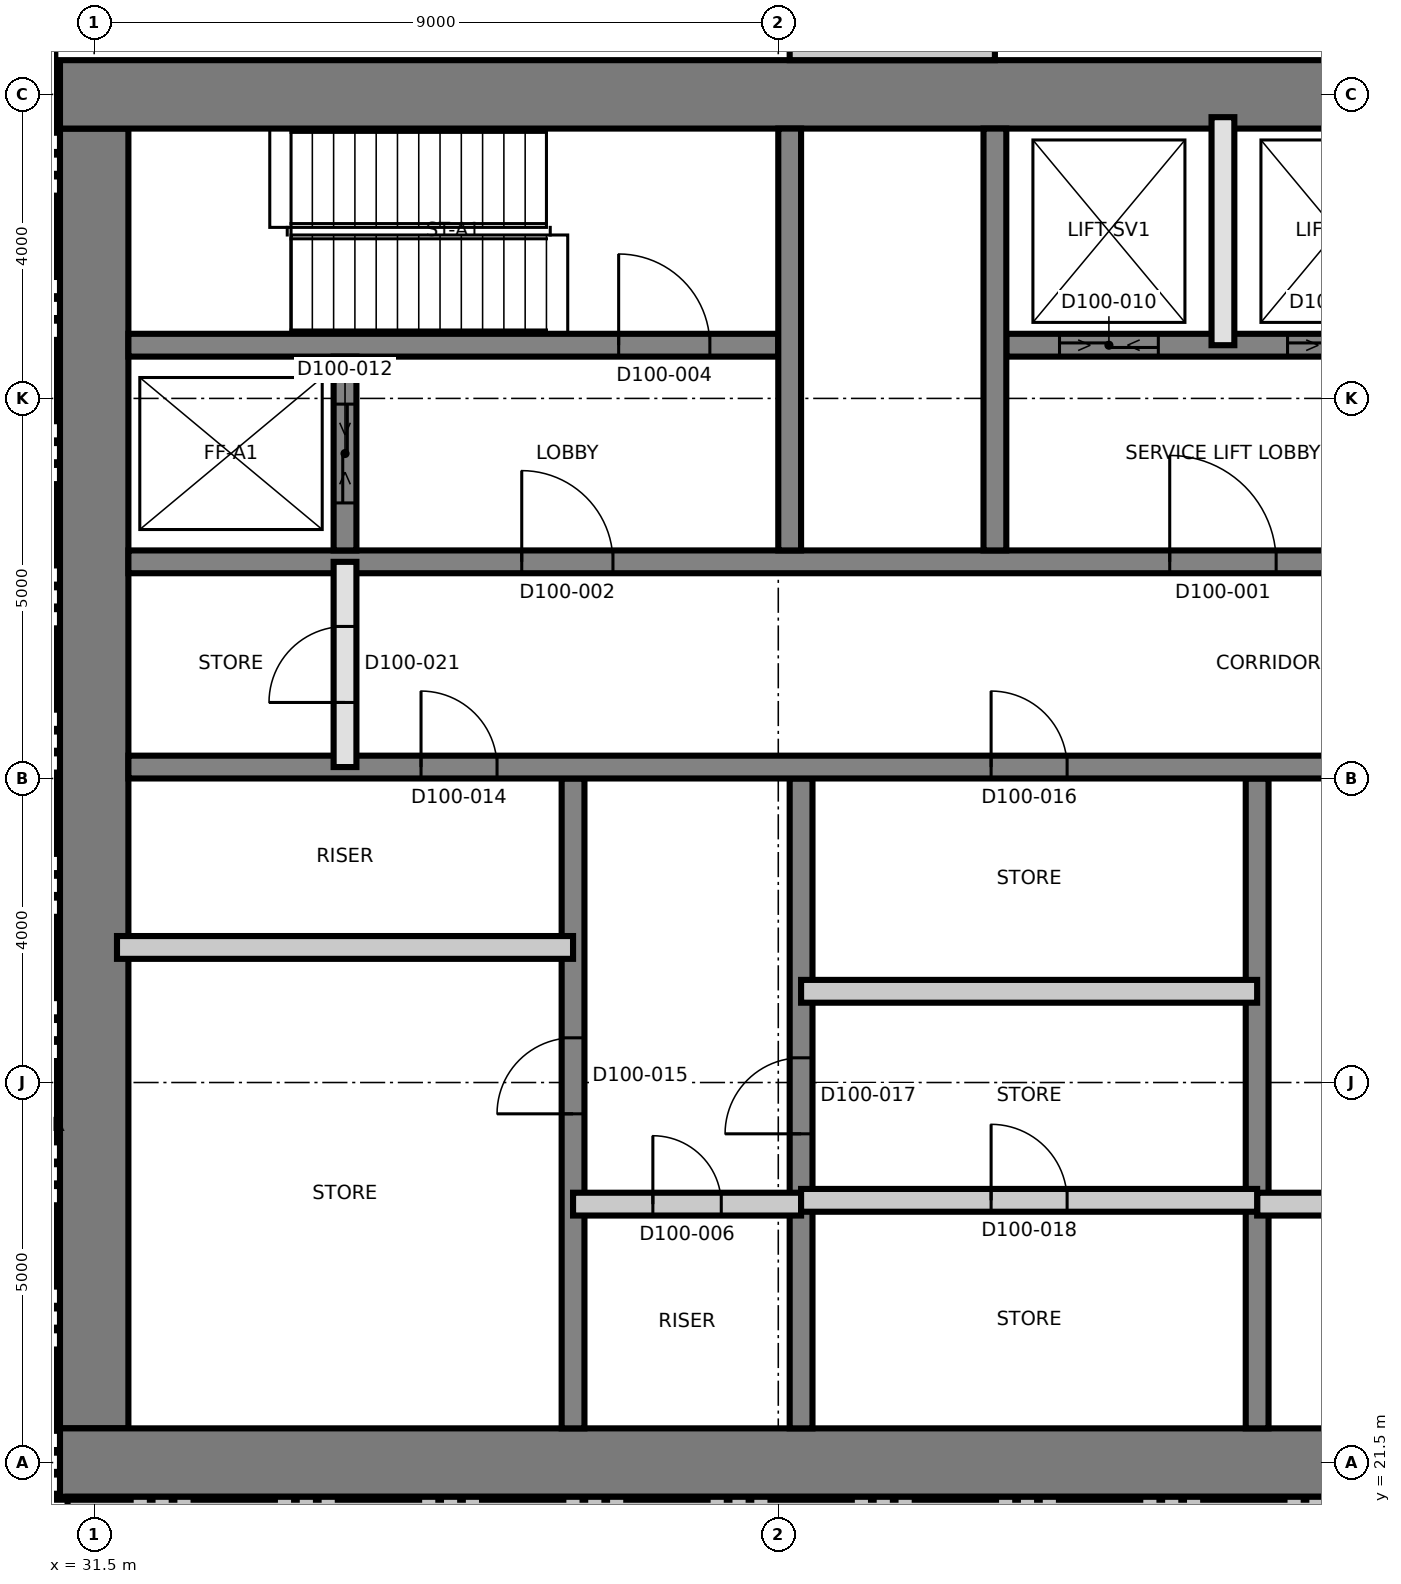
"""IFC4 building model, lengths in metres.
Left out: names, types, materials, properties, quantities, classifications, styles, units other than length and angle.
Written with IfcOpenShell. Run it as: python <this file> out.ifc"""

import sys

from ifc_helpers import new_model, si_unit, direction, frame, frame_2d, origin, place, context, subcontext, project, spatial, rectangle, extrude, element, fill, save


model = new_model("IFC4")
c1 = context("Model", 3, precision=1e-05, world=origin(), true_north=direction((0.0, 1.0)))
c2 = subcontext(c1, "Body", "Model", "MODEL_VIEW")
j1 = project(units=[si_unit("LENGTHUNIT", "METRE"), si_unit("PLANEANGLEUNIT", "RADIAN")], contexts=[c1])
p1 = place(None, origin())
s1 = spatial("IfcSite", under=j1, at=p1, CompositionType="ELEMENT")
p2 = place(p1, origin())
s2 = spatial("IfcBuilding", under=s1, at=p2, CompositionType="ELEMENT")
p3 = place(p2, frame((0.0, 0.0, -9.0)))
s3 = spatial("IfcBuildingStorey", under=s2, at=p3, CompositionType="ELEMENT", Elevation=-9.0)
p4 = place(p3, frame((31.5, 21.95, 0.0), z_axis=(0.0, 0.0, 1.0), x_axis=(0.0, 1.0, 0.0)))
e1 = element("IfcWall", 1, at=p4, inside=s3, PredefinedType="SHEAR", context=c2, shape_type="SweptSolid", body=[
    extrude(rectangle(XDim=17.1, YDim=0.9, at=frame_2d((8.55, 0.0))), origin(), (0.0, 0.0, 1.0), 4.5),
])
for number, where, z_axis, x_axis in (
    (2, (31.05, 21.5, 0.0), (0.0, 0.0, 1.0), (1.0, 0.0, 0.0)),
    (3, (31.05, 39.5, 0.0), (0.0, 0.0, 1.0), (1.0, 0.0, 0.0)),
):
    element("IfcWall", number, at=place(p3, frame(where, z_axis=z_axis, x_axis=x_axis)), inside=s3, PredefinedType="SHEAR", context=c2, shape_type="SweptSolid", body=[
        extrude(rectangle(XDim=27.0, YDim=0.9, at=frame_2d((13.5, 0.0))), origin(), (0.0, 0.0, 1.0), 4.5),
    ])
p5 = place(p3, frame((37.8, 21.95, 0.0), z_axis=(0.0, 0.0, 1.0), x_axis=(0.0, 1.0, 0.0)))
e4 = element("IfcWall", 4, at=p5, inside=s3, PredefinedType="SHEAR", context=c2, shape_type="SweptSolid", body=[
    extrude(rectangle(XDim=8.55, YDim=0.3, at=frame_2d((4.275, 0.0))), origin(), (0.0, 0.0, 1.0), 4.5),
])
p6 = place(p5, frame((4.138, 0.0, 0.0)))
e5 = element("IfcOpeningElement", 5, at=p6, cuts=e4, PredefinedType="OPENING", context=c2, shape_type="SweptSolid", body=[
    extrude(rectangle(XDim=1.0, YDim=2.1, at=frame_2d((0.5, 1.05))), frame((0.0, 0.16, 0.0), z_axis=(0.0, -1.0, 0.0), x_axis=(1.0, 0.0, 0.0)), (0.0, 0.0, 1.0), 0.32),
])
p7 = place(p3, frame((40.8, 21.95, 0.0), z_axis=(0.0, 0.0, 1.0), x_axis=(0.0, 1.0, 0.0)))
e6 = element("IfcWall", 6, at=p7, inside=s3, PredefinedType="SHEAR", context=c2, shape_type="SweptSolid", body=[
    extrude(rectangle(XDim=8.55, YDim=0.3, at=frame_2d((4.275, 0.0))), origin(), (0.0, 0.0, 1.0), 4.5),
])
p8 = place(p7, frame((3.875, 0.0, 0.0)))
e7 = element("IfcOpeningElement", 7, at=p8, cuts=e6, PredefinedType="OPENING", context=c2, shape_type="SweptSolid", body=[
    extrude(rectangle(XDim=1.0, YDim=2.1, at=frame_2d((0.5, 1.05))), frame((0.0, 0.16, 0.0), z_axis=(0.0, -1.0, 0.0), x_axis=(1.0, 0.0, 0.0)), (0.0, 0.0, 1.0), 0.32),
])
p9 = place(p3, frame((46.8, 21.95, 0.0), z_axis=(0.0, 0.0, 1.0), x_axis=(0.0, 1.0, 0.0)))
e8 = element("IfcWall", 8, at=p9, inside=s3, PredefinedType="SHEAR", context=c2, shape_type="SweptSolid", body=[
    extrude(rectangle(XDim=8.55, YDim=0.3, at=frame_2d((4.275, 0.0))), origin(), (0.0, 0.0, 1.0), 4.5),
])
p10 = place(p3, frame((31.95, 30.65, 0.0), z_axis=(0.0, 0.0, 1.0), x_axis=(1.0, 0.0, 0.0)))
e9 = element("IfcWall", 9, at=p10, inside=s3, PredefinedType="SHEAR", context=c2, shape_type="SweptSolid", body=[
    extrude(rectangle(XDim=26.1, YDim=0.3, at=frame_2d((13.05, 0.0))), origin(), (0.0, 0.0, 1.0), 4.5),
])
p11 = place(p10, frame((24.55, 0.0, 0.0)))
e10 = element("IfcOpeningElement", 10, at=p11, cuts=e9, PredefinedType="OPENING", context=c2, shape_type="SweptSolid", body=[
    extrude(rectangle(XDim=1.0, YDim=2.1, at=frame_2d((0.5, 1.05))), frame((0.0, 0.16, 0.0), z_axis=(0.0, -1.0, 0.0), x_axis=(1.0, 0.0, 0.0)), (0.0, 0.0, 1.0), 0.32),
])
p12 = place(p10, frame((3.85, 0.0, 0.0)))
e11 = element("IfcOpeningElement", 11, at=p12, cuts=e9, PredefinedType="OPENING", context=c2, shape_type="SweptSolid", body=[
    extrude(rectangle(XDim=1.0, YDim=2.1, at=frame_2d((0.5, 1.05))), frame((0.0, 0.16, 0.0), z_axis=(0.0, -1.0, 0.0), x_axis=(1.0, 0.0, 0.0)), (0.0, 0.0, 1.0), 0.32),
])
p13 = place(p10, frame((11.35, 0.0, 0.0)))
e12 = element("IfcOpeningElement", 12, at=p13, cuts=e9, PredefinedType="OPENING", context=c2, shape_type="SweptSolid", body=[
    extrude(rectangle(XDim=1.0, YDim=2.1, at=frame_2d((0.5, 1.05))), frame((0.0, 0.16, 0.0), z_axis=(0.0, -1.0, 0.0), x_axis=(1.0, 0.0, 0.0)), (0.0, 0.0, 1.0), 0.32),
])
p14 = place(p3, frame((31.95, 33.35, 0.0), z_axis=(0.0, 0.0, 1.0), x_axis=(1.0, 0.0, 0.0)))
e13 = element("IfcWall", 13, at=p14, inside=s3, PredefinedType="SHEAR", context=c2, shape_type="SweptSolid", body=[
    extrude(rectangle(XDim=26.1, YDim=0.3, at=frame_2d((13.05, 0.0))), origin(), (0.0, 0.0, 1.0), 4.5),
])
p15 = place(p14, frame((13.7, 0.0, 0.0)))
e14 = element("IfcOpeningElement", 14, at=p15, cuts=e13, PredefinedType="OPENING", context=c2, shape_type="SweptSolid", body=[
    extrude(rectangle(XDim=1.4, YDim=2.1, at=frame_2d((0.7, 1.05))), frame((0.0, 0.16, 0.0), z_axis=(0.0, -1.0, 0.0), x_axis=(1.0, 0.0, 0.0)), (0.0, 0.0, 1.0), 0.32),
])
p16 = place(p14, frame((5.175, 0.0, 0.0)))
e15 = element("IfcOpeningElement", 15, at=p16, cuts=e13, PredefinedType="OPENING", context=c2, shape_type="SweptSolid", body=[
    extrude(rectangle(XDim=1.2, YDim=2.1, at=frame_2d((0.6, 1.05))), frame((0.0, 0.16, 0.0), z_axis=(0.0, -1.0, 0.0), x_axis=(1.0, 0.0, 0.0)), (0.0, 0.0, 1.0), 0.32),
])
p17 = place(p14, frame((19.725, 0.0, 0.0)))
e16 = element("IfcOpeningElement", 16, at=p17, cuts=e13, PredefinedType="OPENING", context=c2, shape_type="SweptSolid", body=[
    extrude(rectangle(XDim=1.2, YDim=2.1, at=frame_2d((0.6, 1.05))), frame((0.0, 0.16, 0.0), z_axis=(0.0, -1.0, 0.0), x_axis=(1.0, 0.0, 0.0)), (0.0, 0.0, 1.0), 0.32),
])
p18 = place(p3, frame((31.95, 36.2, 0.0), z_axis=(0.0, 0.0, 1.0), x_axis=(1.0, 0.0, 0.0)))
e17 = element("IfcWall", 17, at=p18, inside=s3, PredefinedType="SHEAR", context=c2, shape_type="SweptSolid", body=[
    extrude(rectangle(XDim=8.55, YDim=0.3, at=frame_2d((4.275, 0.0))), origin(), (0.0, 0.0, 1.0), 4.5),
])
p19 = place(p18, frame((6.45, 0.0, 0.0)))
e18 = element("IfcOpeningElement", 18, at=p19, cuts=e17, PredefinedType="OPENING", context=c2, shape_type="SweptSolid", body=[
    extrude(rectangle(XDim=1.2, YDim=2.1, at=frame_2d((0.6, 1.05))), frame((0.0, 0.16, 0.0), z_axis=(0.0, -1.0, 0.0), x_axis=(1.0, 0.0, 0.0)), (0.0, 0.0, 1.0), 0.32),
])
p20 = place(p3, frame((43.5, 36.2, 0.0), z_axis=(0.0, 0.0, 1.0), x_axis=(1.0, 0.0, 0.0)))
e19 = element("IfcWall", 19, at=p20, inside=s3, PredefinedType="SHEAR", context=c2, shape_type="SweptSolid", body=[
    extrude(rectangle(XDim=14.55, YDim=0.3, at=frame_2d((7.275, 0.0))), origin(), (0.0, 0.0, 1.0), 4.5),
])
p21 = place(p20, frame((6.9, 0.0, 0.0)))
e20 = element("IfcOpeningElement", 20, at=p21, cuts=e19, PredefinedType="OPENING", context=c2, shape_type="SweptSolid", body=[
    extrude(rectangle(XDim=1.2, YDim=2.1, at=frame_2d((0.6, 1.05))), frame((0.0, 0.16, 0.0), z_axis=(0.0, -1.0, 0.0), x_axis=(1.0, 0.0, 0.0)), (0.0, 0.0, 1.0), 0.32),
])
p22 = place(p20, frame((0.7, 0.0, 0.0)))
e21 = element("IfcOpeningElement", 21, at=p22, cuts=e19, PredefinedType="OPENING", context=c2, shape_type="SweptSolid", body=[
    extrude(rectangle(XDim=1.3, YDim=2.4, at=frame_2d((0.65, 1.2))), frame((0.0, 0.16, 0.0), z_axis=(0.0, -1.0, 0.0), x_axis=(1.0, 0.0, 0.0)), (0.0, 0.0, 1.0), 0.32),
])
p23 = place(p20, frame((3.7, 0.0, 0.0)))
e22 = element("IfcOpeningElement", 22, at=p23, cuts=e19, PredefinedType="OPENING", context=c2, shape_type="SweptSolid", body=[
    extrude(rectangle(XDim=1.3, YDim=2.4, at=frame_2d((0.65, 1.2))), frame((0.0, 0.16, 0.0), z_axis=(0.0, -1.0, 0.0), x_axis=(1.0, 0.0, 0.0)), (0.0, 0.0, 1.0), 0.32),
])
for number, where, z_axis, x_axis in (
    (23, (40.65, 33.5, 0.0), (0.0, 0.0, 1.0), (0.0, 1.0, 0.0)),
    (24, (43.35, 33.5, 0.0), (0.0, 0.0, 1.0), (0.0, 1.0, 0.0)),
):
    element("IfcWall", number, at=place(p3, frame(where, z_axis=z_axis, x_axis=x_axis)), inside=s3, PredefinedType="SHEAR", context=c2, shape_type="SweptSolid", body=[
        extrude(rectangle(XDim=5.55, YDim=0.3, at=frame_2d((2.775, 0.0))), origin(), (0.0, 0.0, 1.0), 4.5),
    ])
p24 = place(p3, frame((34.8, 33.5, 0.0), z_axis=(0.0, 0.0, 1.0), x_axis=(0.0, 1.0, 0.0)))
e25 = element("IfcWall", 25, at=p24, inside=s3, PredefinedType="SHEAR", context=c2, shape_type="SweptSolid", body=[
    extrude(rectangle(XDim=2.55, YDim=0.3, at=frame_2d((1.275, 0.0))), origin(), (0.0, 0.0, 1.0), 4.5),
])
p25 = place(p24, frame((0.625, 0.0, 0.0)))
e26 = element("IfcOpeningElement", 26, at=p25, cuts=e25, PredefinedType="OPENING", context=c2, shape_type="SweptSolid", body=[
    extrude(rectangle(XDim=1.3, YDim=2.4, at=frame_2d((0.65, 1.2))), frame((0.0, 0.16, 0.0), z_axis=(0.0, -1.0, 0.0), x_axis=(1.0, 0.0, 0.0)), (0.0, 0.0, 1.0), 0.32),
])
p26 = place(p3, frame((37.8, 24.9, 0.0), z_axis=(0.0, 0.0, 1.0), x_axis=(1.0, 0.0, 0.0)))
e27 = element("IfcWall", 27, at=p26, inside=s3, PredefinedType="PARTITIONING", context=c2, shape_type="SweptSolid", body=[
    extrude(rectangle(XDim=3.0, YDim=0.3, at=frame_2d((1.5, 0.0))), origin(), (0.0, 0.0, 1.0), 4.2),
])
p27 = place(p26, frame((1.05, 0.0, 0.0)))
e28 = element("IfcOpeningElement", 28, at=p27, cuts=e27, PredefinedType="OPENING", context=c2, shape_type="SweptSolid", body=[
    extrude(rectangle(XDim=0.9, YDim=2.1, at=frame_2d((0.45, 1.05))), frame((0.0, 0.16, 0.0), z_axis=(0.0, -1.0, 0.0), x_axis=(1.0, 0.0, 0.0)), (0.0, 0.0, 1.0), 0.32),
])
p28 = place(p3, frame((46.8, 24.9, 0.0), z_axis=(0.0, 0.0, 1.0), x_axis=(1.0, 0.0, 0.0)))
e29 = element("IfcWall", 29, at=p28, inside=s3, PredefinedType="PARTITIONING", context=c2, shape_type="SweptSolid", body=[
    extrude(rectangle(XDim=3.0, YDim=0.3, at=frame_2d((1.5, 0.0))), origin(), (0.0, 0.0, 1.0), 4.2),
])
p29 = place(p28, frame((1.05, 0.0, 0.0)))
e30 = element("IfcOpeningElement", 30, at=p29, cuts=e29, PredefinedType="OPENING", context=c2, shape_type="SweptSolid", body=[
    extrude(rectangle(XDim=0.9, YDim=2.1, at=frame_2d((0.45, 1.05))), frame((0.0, 0.16, 0.0), z_axis=(0.0, -1.0, 0.0), x_axis=(1.0, 0.0, 0.0)), (0.0, 0.0, 1.0), 0.32),
])
p30 = place(p3, frame((40.8, 24.95, 0.0), z_axis=(0.0, 0.0, 1.0), x_axis=(1.0, 0.0, 0.0)))
e31 = element("IfcWall", 31, at=p30, inside=s3, PredefinedType="PARTITIONING", context=c2, shape_type="SweptSolid", body=[
    extrude(rectangle(XDim=6.0, YDim=0.3, at=frame_2d((3.0, 0.0))), origin(), (0.0, 0.0, 1.0), 4.2),
])
p31 = place(p30, frame((2.5, 0.0, 0.0)))
e32 = element("IfcOpeningElement", 32, at=p31, cuts=e31, PredefinedType="OPENING", context=c2, shape_type="SweptSolid", body=[
    extrude(rectangle(XDim=1.0, YDim=2.1, at=frame_2d((0.5, 1.05))), frame((0.0, 0.16, 0.0), z_axis=(0.0, -1.0, 0.0), x_axis=(1.0, 0.0, 0.0)), (0.0, 0.0, 1.0), 0.32),
])
for number, where, z_axis, x_axis in (
    (33, (40.8, 27.7, 0.0), (0.0, 0.0, 1.0), (1.0, 0.0, 0.0)),
    (34, (31.8, 28.277, 0.0), (0.0, 0.0, 1.0), (1.0, 0.0, 0.0)),
):
    element("IfcWall", number, at=place(p3, frame(where, z_axis=z_axis, x_axis=x_axis)), inside=s3, PredefinedType="PARTITIONING", context=c2, shape_type="SweptSolid", body=[
        extrude(rectangle(XDim=6.0, YDim=0.3, at=frame_2d((3.0, 0.0))), origin(), (0.0, 0.0, 1.0), 4.2),
    ])
p32 = place(p3, frame((40.65, 40.1, 0.0), z_axis=(0.0, 0.0, 1.0), x_axis=(1.0, 0.0, 0.0)))
e35 = element("IfcWall", 35, at=p32, inside=s3, PredefinedType="PARTITIONING", context=c2, shape_type="SweptSolid", body=[
    extrude(rectangle(XDim=2.7, YDim=0.3, at=frame_2d((1.35, 0.0))), origin(), (0.0, 0.0, 1.0), 4.2),
])
p33 = place(p3, frame((34.8, 30.65, 0.0), z_axis=(0.0, 0.0, 1.0), x_axis=(0.0, 1.0, 0.0)))
e36 = element("IfcWall", 36, at=p33, inside=s3, PredefinedType="SOLIDWALL", context=c2, shape_type="SweptSolid", body=[
    extrude(rectangle(XDim=2.7, YDim=0.3, at=frame_2d((1.35, 0.0))), origin(), (0.0, 0.0, 1.0), 4.2),
])
p34 = place(p33, frame((0.85, 0.0, 0.0)))
e37 = element("IfcOpeningElement", 37, at=p34, cuts=e36, PredefinedType="OPENING", context=c2, shape_type="SweptSolid", body=[
    extrude(rectangle(XDim=1.0, YDim=2.1, at=frame_2d((0.5, 1.05))), frame((0.0, 0.16, 0.0), z_axis=(0.0, -1.0, 0.0), x_axis=(1.0, 0.0, 0.0)), (0.0, 0.0, 1.0), 0.32),
])
p35 = place(p3, frame((46.35, 36.2, 0.0), z_axis=(0.0, 0.0, 1.0), x_axis=(0.0, 1.0, 0.0)))
e38 = element("IfcWall", 38, at=p35, inside=s3, PredefinedType="SOLIDWALL", context=c2, shape_type="SweptSolid", body=[
    extrude(rectangle(XDim=3.0, YDim=0.3, at=frame_2d((1.5, 0.0))), origin(), (0.0, 0.0, 1.0), 4.2),
])
p36 = place(p3, frame((31.15, 20.95, 0.0), z_axis=(0.0, 0.0, 1.0), x_axis=(1.0, 0.0, 0.0)))
e39 = element("IfcWall", 39, at=p36, inside=s3, PredefinedType="PARTITIONING", context=c2, shape_type="SweptSolid", body=[
    extrude(rectangle(XDim=27.9, YDim=0.2, at=frame_2d((13.95, 0.0))), origin(), (0.0, 0.0, 1.0), 4.2),
])
p37 = place(p15, origin())
e40 = element("IfcDoor", 40, at=p37, inside=s3, OperationType="SINGLE_SWING_RIGHT", PredefinedType="DOOR", context=c2, shape_type="SweptSolid", body=[
    extrude(rectangle(XDim=1.4, YDim=2.1, at=frame_2d((0.7, 1.05))), frame((0.0, 0.025, 0.0), z_axis=(0.0, -1.0, 0.0), x_axis=(1.0, 0.0, 0.0)), (0.0, 0.0, 1.0), 0.05),
])
fill(e14, e40)
p38 = place(p16, origin())
e41 = element("IfcDoor", 41, at=p38, inside=s3, OperationType="SINGLE_SWING_LEFT", PredefinedType="DOOR", context=c2, shape_type="SweptSolid", body=[
    extrude(rectangle(XDim=1.2, YDim=2.1, at=frame_2d((0.6, 1.05))), frame((0.0, 0.025, 0.0), z_axis=(0.0, -1.0, 0.0), x_axis=(1.0, 0.0, 0.0)), (0.0, 0.0, 1.0), 0.05),
])
fill(e15, e41)
p39 = place(p19, origin())
e42 = element("IfcDoor", 42, at=p39, inside=s3, OperationType="SINGLE_SWING_RIGHT", PredefinedType="DOOR", context=c2, shape_type="SweptSolid", body=[
    extrude(rectangle(XDim=1.2, YDim=2.1, at=frame_2d((0.6, 1.05))), frame((0.0, 0.025, 0.0), z_axis=(0.0, -1.0, 0.0), x_axis=(1.0, 0.0, 0.0)), (0.0, 0.0, 1.0), 0.05),
])
fill(e18, e42)
p40 = place(p27, origin())
e43 = element("IfcDoor", 43, at=p40, inside=s3, OperationType="SINGLE_SWING_LEFT", PredefinedType="DOOR", context=c2, shape_type="SweptSolid", body=[
    extrude(rectangle(XDim=0.9, YDim=2.1, at=frame_2d((0.45, 1.05))), frame((0.0, 0.025, 0.0), z_axis=(0.0, -1.0, 0.0), x_axis=(1.0, 0.0, 0.0)), (0.0, 0.0, 1.0), 0.05),
])
fill(e28, e43)
p41 = place(p22, origin())
e44 = element("IfcDoor", 44, at=p41, inside=s3, OperationType="SLIDING_TO_LEFT", PredefinedType="DOOR", context=c2, shape_type="SweptSolid", body=[
    extrude(rectangle(XDim=1.3, YDim=2.4, at=frame_2d((0.65, 1.2))), frame((0.0, 0.025, 0.0), z_axis=(0.0, -1.0, 0.0), x_axis=(1.0, 0.0, 0.0)), (0.0, 0.0, 1.0), 0.05),
])
fill(e21, e44)
p42 = place(p23, origin())
e45 = element("IfcDoor", 45, at=p42, inside=s3, OperationType="SLIDING_TO_LEFT", PredefinedType="DOOR", context=c2, shape_type="SweptSolid", body=[
    extrude(rectangle(XDim=1.3, YDim=2.4, at=frame_2d((0.65, 1.2))), frame((0.0, 0.025, 0.0), z_axis=(0.0, -1.0, 0.0), x_axis=(1.0, 0.0, 0.0)), (0.0, 0.0, 1.0), 0.05),
])
fill(e22, e45)
p43 = place(p25, origin())
e46 = element("IfcDoor", 46, at=p43, inside=s3, OperationType="SLIDING_TO_LEFT", PredefinedType="DOOR", context=c2, shape_type="SweptSolid", body=[
    extrude(rectangle(XDim=1.3, YDim=2.4, at=frame_2d((0.65, 1.2))), frame((0.0, 0.025, 0.0), z_axis=(0.0, -1.0, 0.0), x_axis=(1.0, 0.0, 0.0)), (0.0, 0.0, 1.0), 0.05),
])
fill(e26, e46)
p44 = place(p12, origin())
e47 = element("IfcDoor", 47, at=p44, inside=s3, OperationType="SINGLE_SWING_LEFT", PredefinedType="DOOR", context=c2, shape_type="SweptSolid", body=[
    extrude(rectangle(XDim=1.0, YDim=2.1, at=frame_2d((0.5, 1.05))), frame((0.0, 0.025, 0.0), z_axis=(0.0, -1.0, 0.0), x_axis=(1.0, 0.0, 0.0)), (0.0, 0.0, 1.0), 0.05),
])
fill(e11, e47)
p45 = place(p6, origin())
e48 = element("IfcDoor", 48, at=p45, inside=s3, OperationType="SINGLE_SWING_RIGHT", PredefinedType="DOOR", context=c2, shape_type="SweptSolid", body=[
    extrude(rectangle(XDim=1.0, YDim=2.1, at=frame_2d((0.5, 1.05))), frame((0.0, 0.025, 0.0), z_axis=(0.0, -1.0, 0.0), x_axis=(1.0, 0.0, 0.0)), (0.0, 0.0, 1.0), 0.05),
])
fill(e5, e48)
p46 = place(p13, origin())
e49 = element("IfcDoor", 49, at=p46, inside=s3, OperationType="SINGLE_SWING_LEFT", PredefinedType="DOOR", context=c2, shape_type="SweptSolid", body=[
    extrude(rectangle(XDim=1.0, YDim=2.1, at=frame_2d((0.5, 1.05))), frame((0.0, 0.025, 0.0), z_axis=(0.0, -1.0, 0.0), x_axis=(1.0, 0.0, 0.0)), (0.0, 0.0, 1.0), 0.05),
])
fill(e12, e49)
p47 = place(p8, origin())
e50 = element("IfcDoor", 50, at=p47, inside=s3, OperationType="SINGLE_SWING_RIGHT", PredefinedType="DOOR", context=c2, shape_type="SweptSolid", body=[
    extrude(rectangle(XDim=1.0, YDim=2.1, at=frame_2d((0.5, 1.05))), frame((0.0, 0.025, 0.0), z_axis=(0.0, -1.0, 0.0), x_axis=(1.0, 0.0, 0.0)), (0.0, 0.0, 1.0), 0.05),
])
fill(e7, e50)
p48 = place(p31, origin())
e51 = element("IfcDoor", 51, at=p48, inside=s3, OperationType="SINGLE_SWING_RIGHT", PredefinedType="DOOR", context=c2, shape_type="SweptSolid", body=[
    extrude(rectangle(XDim=1.0, YDim=2.1, at=frame_2d((0.5, 1.05))), frame((0.0, 0.025, 0.0), z_axis=(0.0, -1.0, 0.0), x_axis=(1.0, 0.0, 0.0)), (0.0, 0.0, 1.0), 0.05),
])
fill(e32, e51)
p49 = place(p34, origin())
e52 = element("IfcDoor", 52, at=p49, inside=s3, OperationType="SINGLE_SWING_RIGHT", PredefinedType="DOOR", context=c2, shape_type="SweptSolid", body=[
    extrude(rectangle(XDim=1.0, YDim=2.1, at=frame_2d((0.5, 1.05))), frame((0.0, 0.025, 0.0), z_axis=(0.0, -1.0, 0.0), x_axis=(1.0, 0.0, 0.0)), (0.0, 0.0, 1.0), 0.05),
])
fill(e37, e52)
save(model, sys.argv[1])
